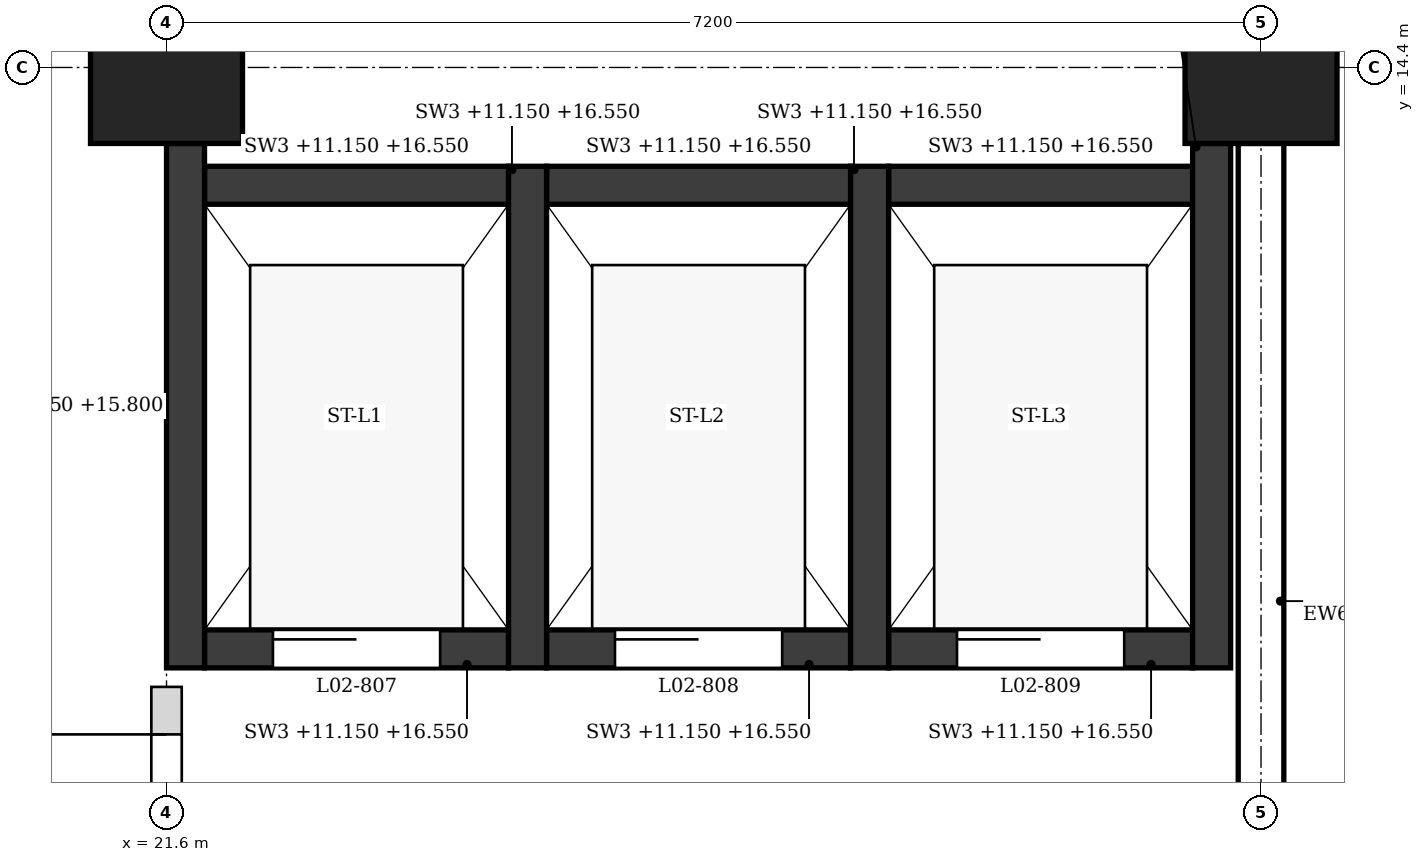
"""IFC4 building model, lengths in metres.
Left out: names, types, materials, properties, quantities, classifications, styles, units other than length and angle.
Written with IfcOpenShell. Run it as: python <this file> out.ifc"""

import sys

from ifc_helpers import new_model, si_unit, direction, frame, frame_2d, origin, origin_2d, place, context, subcontext, project, spatial, rectangle, extrude, element, fill, save


model = new_model("IFC4")
c1 = context("Model", 3, precision=1e-05, world=origin(), true_north=direction((0.0, 1.0)))
c2 = subcontext(c1, "Body", "Model", "MODEL_VIEW")
j1 = project(units=[si_unit("LENGTHUNIT", "METRE"), si_unit("PLANEANGLEUNIT", "RADIAN")], contexts=[c1])
p1 = place(None, origin())
s1 = spatial("IfcSite", under=j1, at=p1, CompositionType="ELEMENT")
p2 = place(p1, origin())
s2 = spatial("IfcBuilding", under=s1, at=p2, CompositionType="ELEMENT")
p3 = place(p2, frame((0.0, 0.0, 11.4)))
s3 = spatial("IfcBuildingStorey", under=s2, at=p3, CompositionType="ELEMENT", Elevation=11.4)
for number, where, z_axis, x_axis in (
    (1, (21.6, 14.4, 0.0), (0.0, 0.0, 1.0), (1.0, 0.0, 0.0)),
    (2, (28.8, 14.4, 0.0), (0.0, 0.0, 1.0), (1.0, 0.0, 0.0)),
):
    element("IfcColumn", number, at=place(p3, frame(where, z_axis=z_axis, x_axis=x_axis)), inside=s3, PredefinedType="COLUMN", context=c2, shape_type="SweptSolid", body=[
        extrude(rectangle(XDim=1.0, YDim=1.0, at=origin_2d()), origin(), (0.0, 0.0, 1.0), 5.4),
    ])
p4 = place(p3, frame((28.8, 7.7, 0.0), z_axis=(0.0, 0.0, 1.0), x_axis=(0.0, 1.0, 0.0)))
e3 = element("IfcWall", 3, at=p4, inside=s3, PredefinedType="STANDARD", context=c2, shape_type="SweptSolid", body=[
    extrude(rectangle(XDim=6.2, YDim=0.3, at=frame_2d((3.1, 0.0))), origin(), (0.0, 0.0, 1.0), 4.55),
])
p5 = place(p3, frame((21.725, 10.45, -0.25), z_axis=(0.0, 0.0, 1.0), x_axis=(0.0, 1.0, 0.0)))
e4 = element("IfcWall", 4, at=p5, inside=s3, PredefinedType="SHEAR", context=c2, shape_type="SweptSolid", body=[
    extrude(rectangle(XDim=3.45, YDim=0.25, at=frame_2d((1.725, 0.0))), origin(), (0.0, 0.0, 1.0), 4.65),
])
for number, where, z_axis, x_axis in (
    (5, (23.975, 10.45, -0.25), (0.0, 0.0, 1.0), (0.0, 1.0, 0.0)),
    (6, (26.225, 10.45, -0.25), (0.0, 0.0, 1.0), (0.0, 1.0, 0.0)),
):
    element("IfcWall", number, at=place(p3, frame(where, z_axis=z_axis, x_axis=x_axis)), inside=s3, PredefinedType="SHEAR", context=c2, shape_type="SweptSolid", body=[
        extrude(rectangle(XDim=3.3, YDim=0.25, at=frame_2d((1.65, 0.0))), origin(), (0.0, 0.0, 1.0), 5.4),
    ])
p6 = place(p3, frame((28.475, 10.45, -0.25), z_axis=(0.0, 0.0, 1.0), x_axis=(0.0, 1.0, 0.0)))
e7 = element("IfcWall", 7, at=p6, inside=s3, PredefinedType="SHEAR", context=c2, shape_type="SweptSolid", body=[
    extrude(rectangle(XDim=3.45, YDim=0.25, at=frame_2d((1.725, 0.0))), origin(), (0.0, 0.0, 1.0), 5.4),
])
p7 = place(p3, frame((21.85, 10.575, -0.25), z_axis=(0.0, 0.0, 1.0), x_axis=(1.0, 0.0, 0.0)))
e8 = element("IfcWall", 8, at=p7, inside=s3, PredefinedType="SHEAR", context=c2, shape_type="SweptSolid", body=[
    extrude(rectangle(XDim=2.0, YDim=0.25, at=frame_2d((1.0, 0.0))), origin(), (0.0, 0.0, 1.0), 5.4),
])
p8 = place(p7, frame((0.45, 0.0, 0.25)))
e9 = element("IfcOpeningElement", 9, at=p8, cuts=e8, PredefinedType="OPENING", context=c2, shape_type="SweptSolid", body=[
    extrude(rectangle(XDim=1.1, YDim=2.1, at=frame_2d((0.55, 1.05))), frame((0.0, 0.135, 0.0), z_axis=(0.0, -1.0, 0.0), x_axis=(1.0, 0.0, 0.0)), (0.0, 0.0, 1.0), 0.27),
])
p9 = place(p3, frame((21.85, 13.625, -0.25), z_axis=(0.0, 0.0, 1.0), x_axis=(1.0, 0.0, 0.0)))
e10 = element("IfcWall", 10, at=p9, inside=s3, PredefinedType="SHEAR", context=c2, shape_type="SweptSolid", body=[
    extrude(rectangle(XDim=2.0, YDim=0.25, at=frame_2d((1.0, 0.0))), origin(), (0.0, 0.0, 1.0), 5.4),
])
p10 = place(p3, frame((24.1, 10.575, -0.25), z_axis=(0.0, 0.0, 1.0), x_axis=(1.0, 0.0, 0.0)))
e11 = element("IfcWall", 11, at=p10, inside=s3, PredefinedType="SHEAR", context=c2, shape_type="SweptSolid", body=[
    extrude(rectangle(XDim=2.0, YDim=0.25, at=frame_2d((1.0, 0.0))), origin(), (0.0, 0.0, 1.0), 5.4),
])
p11 = place(p10, frame((0.45, 0.0, 0.25)))
e12 = element("IfcOpeningElement", 12, at=p11, cuts=e11, PredefinedType="OPENING", context=c2, shape_type="SweptSolid", body=[
    extrude(rectangle(XDim=1.1, YDim=2.1, at=frame_2d((0.55, 1.05))), frame((0.0, 0.135, 0.0), z_axis=(0.0, -1.0, 0.0), x_axis=(1.0, 0.0, 0.0)), (0.0, 0.0, 1.0), 0.27),
])
p12 = place(p3, frame((24.1, 13.625, -0.25), z_axis=(0.0, 0.0, 1.0), x_axis=(1.0, 0.0, 0.0)))
e13 = element("IfcWall", 13, at=p12, inside=s3, PredefinedType="SHEAR", context=c2, shape_type="SweptSolid", body=[
    extrude(rectangle(XDim=2.0, YDim=0.25, at=frame_2d((1.0, 0.0))), origin(), (0.0, 0.0, 1.0), 5.4),
])
p13 = place(p3, frame((26.35, 10.575, -0.25), z_axis=(0.0, 0.0, 1.0), x_axis=(1.0, 0.0, 0.0)))
e14 = element("IfcWall", 14, at=p13, inside=s3, PredefinedType="SHEAR", context=c2, shape_type="SweptSolid", body=[
    extrude(rectangle(XDim=2.0, YDim=0.25, at=frame_2d((1.0, 0.0))), origin(), (0.0, 0.0, 1.0), 5.4),
])
p14 = place(p13, frame((0.45, 0.0, 0.25)))
e15 = element("IfcOpeningElement", 15, at=p14, cuts=e14, PredefinedType="OPENING", context=c2, shape_type="SweptSolid", body=[
    extrude(rectangle(XDim=1.1, YDim=2.1, at=frame_2d((0.55, 1.05))), frame((0.0, 0.135, 0.0), z_axis=(0.0, -1.0, 0.0), x_axis=(1.0, 0.0, 0.0)), (0.0, 0.0, 1.0), 0.27),
])
p15 = place(p3, frame((26.35, 13.625, -0.25), z_axis=(0.0, 0.0, 1.0), x_axis=(1.0, 0.0, 0.0)))
e16 = element("IfcWall", 16, at=p15, inside=s3, PredefinedType="SHEAR", context=c2, shape_type="SweptSolid", body=[
    extrude(rectangle(XDim=2.0, YDim=0.25, at=frame_2d((1.0, 0.0))), origin(), (0.0, 0.0, 1.0), 5.4),
])
p16 = place(p3, frame((21.6, 7.7, 0.0), z_axis=(0.0, 0.0, 1.0), x_axis=(0.0, 1.0, 0.0)))
e17 = element("IfcWall", 17, at=p16, inside=s3, PredefinedType="PARTITIONING", context=c2, shape_type="SweptSolid", body=[
    extrude(rectangle(XDim=2.625, YDim=0.2, at=frame_2d((1.312, 0.0))), origin(), (0.0, 0.0, 1.0), 4.4),
])
p17 = place(p16, frame((0.312, 0.0, 0.0)))
e18 = element("IfcOpeningElement", 18, at=p17, cuts=e17, PredefinedType="OPENING", context=c2, shape_type="SweptSolid", body=[
    extrude(rectangle(XDim=2.0, YDim=2.4, at=frame_2d((1.0, 1.2))), frame((0.0, 0.11, 0.0), z_axis=(0.0, -1.0, 0.0), x_axis=(1.0, 0.0, 0.0)), (0.0, 0.0, 1.0), 0.22),
])
p18 = place(p8, origin())
e19 = element("IfcDoor", 19, at=p18, inside=s3, OperationType="SLIDING_TO_LEFT", PredefinedType="DOOR", context=c2, shape_type="SweptSolid", body=[
    extrude(rectangle(XDim=1.1, YDim=2.1, at=frame_2d((0.55, 1.05))), frame((0.0, 0.025, 0.0), z_axis=(0.0, -1.0, 0.0), x_axis=(1.0, 0.0, 0.0)), (0.0, 0.0, 1.0), 0.05),
])
fill(e9, e19)
p19 = place(p11, origin())
e20 = element("IfcDoor", 20, at=p19, inside=s3, OperationType="SLIDING_TO_LEFT", PredefinedType="DOOR", context=c2, shape_type="SweptSolid", body=[
    extrude(rectangle(XDim=1.1, YDim=2.1, at=frame_2d((0.55, 1.05))), frame((0.0, 0.025, 0.0), z_axis=(0.0, -1.0, 0.0), x_axis=(1.0, 0.0, 0.0)), (0.0, 0.0, 1.0), 0.05),
])
fill(e12, e20)
p20 = place(p14, origin())
e21 = element("IfcDoor", 21, at=p20, inside=s3, OperationType="SLIDING_TO_LEFT", PredefinedType="DOOR", context=c2, shape_type="SweptSolid", body=[
    extrude(rectangle(XDim=1.1, YDim=2.1, at=frame_2d((0.55, 1.05))), frame((0.0, 0.025, 0.0), z_axis=(0.0, -1.0, 0.0), x_axis=(1.0, 0.0, 0.0)), (0.0, 0.0, 1.0), 0.05),
])
fill(e15, e21)
p21 = place(p17, origin())
e22 = element("IfcDoor", 22, at=p21, inside=s3, OperationType="DOUBLE_DOOR_SINGLE_SWING", PredefinedType="DOOR", context=c2, shape_type="SweptSolid", body=[
    extrude(rectangle(XDim=2.0, YDim=2.4, at=frame_2d((1.0, 1.2))), frame((0.0, 0.025, 0.0), z_axis=(0.0, -1.0, 0.0), x_axis=(1.0, 0.0, 0.0)), (0.0, 0.0, 1.0), 0.05),
])
fill(e18, e22)
save(model, sys.argv[1])
